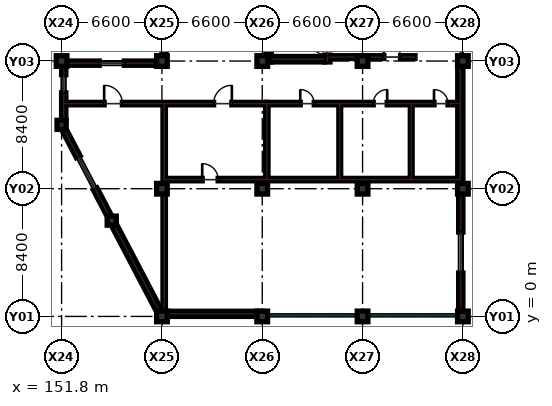
"""IFC4 building model, lengths in metres.
Left out: names, types, materials, properties, quantities, classifications, styles, units other than length and angle.
Written with IfcOpenShell. Run it as: python <this file> out.ifc"""

import sys

from ifc_helpers import new_model, si_unit, direction, frame, frame_2d, origin, origin_2d, place, context, subcontext, project, spatial, rectangle, extrude, element, fill, save


model = new_model("IFC4")
c1 = context("Model", 3, precision=1e-05, world=origin(), true_north=direction((0.0, 1.0)))
c2 = subcontext(c1, "Body", "Model", "MODEL_VIEW")
j1 = project(units=[si_unit("LENGTHUNIT", "METRE"), si_unit("PLANEANGLEUNIT", "RADIAN")], contexts=[c1])
p1 = place(None, origin())
s1 = spatial("IfcSite", under=j1, at=p1, CompositionType="ELEMENT")
p2 = place(p1, origin())
s2 = spatial("IfcBuilding", under=s1, at=p2, CompositionType="ELEMENT")
p3 = place(p2, frame((0.0, 0.0, 27.0)))
s3 = spatial("IfcBuildingStorey", under=s2, at=p3, CompositionType="ELEMENT", Elevation=27.0)
for number, where, z_axis, x_axis in (
    (1, (151.8, 16.8, 0.0), (0.0, 0.0, 1.0), (1.0, 0.0, 0.0)),
    (2, (158.4, 0.0, 0.0), (0.0, 0.0, 1.0), (1.0, 0.0, 0.0)),
    (3, (158.4, 8.4, 0.0), (0.0, 0.0, 1.0), (1.0, 0.0, 0.0)),
    (4, (158.4, 16.8, 0.0), (0.0, 0.0, 1.0), (1.0, 0.0, 0.0)),
    (5, (165.0, 0.0, 0.0), (0.0, 0.0, 1.0), (1.0, 0.0, 0.0)),
    (6, (165.0, 8.4, 0.0), (0.0, 0.0, 1.0), (1.0, 0.0, 0.0)),
    (7, (165.0, 16.8, 0.0), (0.0, 0.0, 1.0), (1.0, 0.0, 0.0)),
    (8, (171.6, 0.0, 0.0), (0.0, 0.0, 1.0), (1.0, 0.0, 0.0)),
    (9, (171.6, 8.4, 0.0), (0.0, 0.0, 1.0), (1.0, 0.0, 0.0)),
    (10, (171.6, 16.8, 0.0), (0.0, 0.0, 1.0), (1.0, 0.0, 0.0)),
    (11, (178.2, 0.0, 0.0), (0.0, 0.0, 1.0), (1.0, 0.0, 0.0)),
    (12, (178.2, 8.4, 0.0), (0.0, 0.0, 1.0), (1.0, 0.0, 0.0)),
    (13, (178.2, 16.8, 0.0), (0.0, 0.0, 1.0), (1.0, 0.0, 0.0)),
):
    element("IfcColumn", number, at=place(p3, frame(where, z_axis=z_axis, x_axis=x_axis)), inside=s3, PredefinedType="COLUMN", context=c2, shape_type="SweptSolid", body=[
        extrude(rectangle(XDim=0.7, YDim=0.7, at=origin_2d()), origin(), (0.0, 0.0, 1.0), 4.2),
    ])
for number, where, z_axis, x_axis in (
    (14, (151.8, 12.6, 0.0), (0.0, 0.0, 1.0), (1.0, 0.0, 0.0)),
    (15, (155.1, 6.3, 0.0), (0.0, 0.0, 1.0), (1.0, 0.0, 0.0)),
):
    element("IfcColumn", number, at=place(p3, frame(where, z_axis=z_axis, x_axis=x_axis)), inside=s3, PredefinedType="COLUMN", context=c2, shape_type="SweptSolid", body=[
        extrude(rectangle(XDim=0.6, YDim=0.6, at=origin_2d()), origin(), (0.0, 0.0, 1.0), 4.2),
    ])
p4 = place(p3, frame((165.3, 14.0, 0.0), z_axis=(0.0, 0.0, 1.0), x_axis=(1.0, 0.0, 0.0)))
e16 = element("IfcWall", 16, at=p4, inside=s3, PredefinedType="PARTITIONING", context=c2, shape_type="SweptSolid", body=[
    extrude(rectangle(XDim=12.7, YDim=0.16, at=frame_2d((6.35, 0.0))), origin(), (0.0, 0.0, 1.0), 3.23),
])
p5 = place(p4, frame((2.2, 0.0, 0.0)))
e17 = element("IfcOpeningElement", 17, at=p5, cuts=e16, PredefinedType="OPENING", context=c2, shape_type="SweptSolid", body=[
    extrude(rectangle(XDim=0.92, YDim=2.08, at=frame_2d((0.46, 1.04))), frame((0.0, 0.09, 0.0), z_axis=(0.0, -1.0, 0.0), x_axis=(1.0, 0.0, 0.0)), (0.0, 0.0, 1.0), 0.18),
])
p6 = place(p4, frame((7.0, 0.0, 0.0)))
e18 = element("IfcOpeningElement", 18, at=p6, cuts=e16, PredefinedType="OPENING", context=c2, shape_type="SweptSolid", body=[
    extrude(rectangle(XDim=0.92, YDim=2.08, at=frame_2d((0.46, 1.04))), frame((0.0, 0.09, 0.0), z_axis=(0.0, -1.0, 0.0), x_axis=(1.0, 0.0, 0.0)), (0.0, 0.0, 1.0), 0.18),
])
p7 = place(p4, frame((11.0, 0.0, 0.0)))
e19 = element("IfcOpeningElement", 19, at=p7, cuts=e16, PredefinedType="OPENING", context=c2, shape_type="SweptSolid", body=[
    extrude(rectangle(XDim=0.92, YDim=2.08, at=frame_2d((0.46, 1.04))), frame((0.0, 0.09, 0.0), z_axis=(0.0, -1.0, 0.0), x_axis=(1.0, 0.0, 0.0)), (0.0, 0.0, 1.0), 0.18),
])
p8 = place(p3, frame((165.3, 9.0, 0.0), z_axis=(0.0, 0.0, 1.0), x_axis=(1.0, 0.0, 0.0)))
e20 = element("IfcWall", 20, at=p8, inside=s3, PredefinedType="PARTITIONING", context=c2, shape_type="SweptSolid", body=[
    extrude(rectangle(XDim=12.7, YDim=0.16, at=frame_2d((6.35, 0.0))), origin(), (0.0, 0.0, 1.0), 3.23),
])
p9 = place(p3, frame((165.3, 9.0, 0.0), z_axis=(0.0, 0.0, 1.0), x_axis=(0.0, 1.0, 0.0)))
e21 = element("IfcWall", 21, at=p9, inside=s3, PredefinedType="PARTITIONING", context=c2, shape_type="SweptSolid", body=[
    extrude(rectangle(XDim=5.0, YDim=0.16, at=frame_2d((2.5, 0.0))), origin(), (0.0, 0.0, 1.0), 3.23),
])
for number, where, z_axis, x_axis in (
    (22, (170.1, 9.0, 0.0), (0.0, 0.0, 1.0), (0.0, 1.0, 0.0)),
    (23, (174.8, 9.0, 0.0), (0.0, 0.0, 1.0), (0.0, 1.0, 0.0)),
):
    element("IfcWall", number, at=place(p3, frame(where, z_axis=z_axis, x_axis=x_axis)), inside=s3, PredefinedType="PARTITIONING", context=c2, shape_type="SweptSolid", body=[
        extrude(rectangle(XDim=5.0, YDim=0.12, at=frame_2d((2.5, 0.0))), origin(), (0.0, 0.0, 1.0), 3.23),
    ])
p10 = place(p3, frame((158.55, 9.0, 0.0), z_axis=(0.0, 0.0, 1.0), x_axis=(1.0, 0.0, 0.0)))
e24 = element("IfcWall", 24, at=p10, inside=s3, PredefinedType="PARTITIONING", context=c2, shape_type="SweptSolid", body=[
    extrude(rectangle(XDim=6.75, YDim=0.16, at=frame_2d((3.375, 0.0))), origin(), (0.0, 0.0, 1.0), 3.23),
])
p11 = place(p10, frame((2.5, 0.0, 0.0)))
e25 = element("IfcOpeningElement", 25, at=p11, cuts=e24, PredefinedType="OPENING", context=c2, shape_type="SweptSolid", body=[
    extrude(rectangle(XDim=1.05, YDim=2.15, at=frame_2d((0.525, 1.075))), frame((0.0, 0.09, 0.0), z_axis=(0.0, -1.0, 0.0), x_axis=(1.0, 0.0, 0.0)), (0.0, 0.0, 1.0), 0.18),
])
p12 = place(p3, frame((158.55, 0.25, 0.0), z_axis=(0.0, 0.0, 1.0), x_axis=(0.0, 1.0, 0.0)))
e26 = element("IfcWall", 26, at=p12, inside=s3, PredefinedType="PARTITIONING", context=c2, shape_type="SweptSolid", body=[
    extrude(rectangle(XDim=7.7, YDim=0.16, at=frame_2d((3.85, 0.0))), origin(), (0.0, 0.0, 1.0), 3.23),
])
p13 = place(p3, frame((158.55, 8.85, 0.0), z_axis=(0.0, 0.0, 1.0), x_axis=(0.0, 1.0, 0.0)))
e27 = element("IfcWall", 27, at=p13, inside=s3, PredefinedType="PARTITIONING", context=c2, shape_type="SweptSolid", body=[
    extrude(rectangle(XDim=5.15, YDim=0.16, at=frame_2d((2.575, 0.0))), origin(), (0.0, 0.0, 1.0), 3.23),
])
p14 = place(p3, frame((152.0, 14.0, 0.0), z_axis=(0.0, 0.0, 1.0), x_axis=(1.0, 0.0, 0.0)))
e28 = element("IfcWall", 28, at=p14, inside=s3, PredefinedType="PARTITIONING", context=c2, shape_type="SweptSolid", body=[
    extrude(rectangle(XDim=13.3, YDim=0.16, at=frame_2d((6.65, 0.0))), origin(), (0.0, 0.0, 1.0), 3.23),
])
p15 = place(p14, frame((2.6, 0.0, 0.0)))
e29 = element("IfcOpeningElement", 29, at=p15, cuts=e28, PredefinedType="OPENING", context=c2, shape_type="SweptSolid", body=[
    extrude(rectangle(XDim=1.2, YDim=2.22, at=frame_2d((0.6, 1.11))), frame((0.0, 0.09, 0.0), z_axis=(0.0, -1.0, 0.0), x_axis=(1.0, 0.0, 0.0)), (0.0, 0.0, 1.0), 0.18),
])
p16 = place(p14, frame((9.8, 0.0, 0.0)))
e30 = element("IfcOpeningElement", 30, at=p16, cuts=e28, PredefinedType="OPENING", context=c2, shape_type="SweptSolid", body=[
    extrude(rectangle(XDim=1.2, YDim=2.22, at=frame_2d((0.6, 1.11))), frame((0.0, 0.09, 0.0), z_axis=(0.0, -1.0, 0.0), x_axis=(1.0, 0.0, 0.0)), (0.0, 0.0, 1.0), 0.18),
])
p17 = place(p3, frame((158.055, 16.66, 0.0), z_axis=(0.0, 0.0, 1.0), x_axis=(-1.0, 0.0, 0.0)))
e31 = element("IfcWall", 31, at=p17, inside=s3, PredefinedType="SOLIDWALL", context=c2, shape_type="SweptSolid", body=[
    extrude(rectangle(XDim=5.91, YDim=0.28, at=frame_2d((2.955, 0.0))), origin(), (0.0, 0.0, 1.0), 3.315),
])
p18 = place(p17, frame((2.13, 0.0, 0.95)))
e32 = element("IfcOpeningElement", 32, at=p18, cuts=e31, PredefinedType="OPENING", context=c2, shape_type="SweptSolid", body=[
    extrude(rectangle(XDim=1.65, YDim=1.55, at=frame_2d((0.825, 0.775))), frame((0.0, 0.15, 0.0), z_axis=(0.0, -1.0, 0.0), x_axis=(1.0, 0.0, 0.0)), (0.0, 0.0, 1.0), 0.3),
])
p19 = place(p3, frame((158.745, 0.17, 0.0), z_axis=(0.0, 0.0, 1.0), x_axis=(1.0, 0.0, 0.0)))
e33 = element("IfcWall", 33, at=p19, inside=s3, PredefinedType="SHEAR", context=c2, shape_type="SweptSolid", body=[
    extrude(rectangle(XDim=5.91, YDim=0.34, at=frame_2d((2.955, 0.0))), origin(), (0.0, 0.0, 1.0), 3.98),
])
p20 = place(p3, frame((158.54, 24.855, 0.0), z_axis=(0.0, 0.0, 1.0), x_axis=(0.0, -1.0, 0.0)))
e34 = element("IfcWall", 34, at=p20, inside=s3, PredefinedType="SOLIDWALL", context=c2, shape_type="SweptSolid", body=[
    extrude(rectangle(XDim=7.71, YDim=0.28, at=frame_2d((3.855, 0.0))), origin(), (0.0, 0.0, 1.0), 3.365),
])
p21 = place(p20, frame((3.28, 0.0, 0.95)))
e35 = element("IfcOpeningElement", 35, at=p21, cuts=e34, PredefinedType="OPENING", context=c2, shape_type="SweptSolid", body=[
    extrude(rectangle(XDim=1.15, YDim=1.6, at=frame_2d((0.575, 0.8))), frame((0.0, 0.15, 0.0), z_axis=(0.0, -1.0, 0.0), x_axis=(1.0, 0.0, 0.0)), (0.0, 0.0, 1.0), 0.3),
])
p22 = place(p3, frame((178.06, 0.345, 0.0), z_axis=(0.0, 0.0, 1.0), x_axis=(0.0, 1.0, 0.0)))
e36 = element("IfcWall", 36, at=p22, inside=s3, PredefinedType="SOLIDWALL", context=c2, shape_type="SweptSolid", body=[
    extrude(rectangle(XDim=7.71, YDim=0.28, at=frame_2d((3.855, 0.0))), origin(), (0.0, 0.0, 1.0), 3.365),
])
p23 = place(p22, frame((2.505, 0.0, 0.95)))
e37 = element("IfcOpeningElement", 37, at=p23, cuts=e36, PredefinedType="OPENING", context=c2, shape_type="SweptSolid", body=[
    extrude(rectangle(XDim=2.7, YDim=2.05, at=frame_2d((1.35, 1.025))), frame((0.0, 0.15, 0.0), z_axis=(0.0, -1.0, 0.0), x_axis=(1.0, 0.0, 0.0)), (0.0, 0.0, 1.0), 0.3),
])
p24 = place(p3, frame((178.03, 8.745, 0.0), z_axis=(0.0, 0.0, 1.0), x_axis=(0.0, 1.0, 0.0)))
e38 = element("IfcWall", 38, at=p24, inside=s3, PredefinedType="SHEAR", context=c2, shape_type="SweptSolid", body=[
    extrude(rectangle(XDim=7.71, YDim=0.34, at=frame_2d((3.855, 0.0))), origin(), (0.0, 0.0, 1.0), 3.98),
])
p25 = place(p3, frame((151.94, 16.455, 0.0), z_axis=(0.0, 0.0, 1.0), x_axis=(0.0, -1.0, 0.0)))
e39 = element("IfcWall", 39, at=p25, inside=s3, PredefinedType="SOLIDWALL", context=c2, shape_type="SweptSolid", body=[
    extrude(rectangle(XDim=3.56, YDim=0.28, at=frame_2d((1.78, 0.0))), origin(), (0.0, 0.0, 1.0), 3.365),
])
p26 = place(p25, frame((0.55, 0.0, 0.95)))
e40 = element("IfcOpeningElement", 40, at=p26, cuts=e39, PredefinedType="OPENING", context=c2, shape_type="SweptSolid", body=[
    extrude(rectangle(XDim=1.2, YDim=1.5, at=frame_2d((0.6, 0.75))), frame((0.0, 0.15, 0.0), z_axis=(0.0, -1.0, 0.0), x_axis=(1.0, 0.0, 0.0)), (0.0, 0.0, 1.0), 0.3),
])
p27 = place(p3, frame((151.95, 12.31, 0.0), z_axis=(0.0, 0.0, 1.0), x_axis=(0.464471613901, -0.885588007981, 0.0)))
e41 = element("IfcWall", 41, at=p27, inside=s3, PredefinedType="SOLIDWALL", context=c2, shape_type="SweptSolid", body=[
    extrude(rectangle(XDim=6.459, YDim=0.28, at=frame_2d((3.229, 0.0))), origin(), (0.0, 0.0, 1.0), 3.365),
])
p28 = place(p27, frame((2.03, 0.0, 0.95)))
e42 = element("IfcOpeningElement", 42, at=p28, cuts=e41, PredefinedType="OPENING", context=c2, shape_type="SweptSolid", body=[
    extrude(rectangle(XDim=2.4, YDim=1.6, at=frame_2d((1.2, 0.8))), frame((0.0, 0.15, 0.0), z_axis=(0.0, -1.0, 0.0), x_axis=(1.0, 0.0, 0.0)), (0.0, 0.0, 1.0), 0.3),
])
p29 = place(p3, frame((155.25, 6.01, 0.0), z_axis=(0.0, 0.0, 1.0), x_axis=(0.464471613901, -0.885588007981, 0.0)))
e43 = element("IfcWall", 43, at=p29, inside=s3, PredefinedType="SHEAR", context=c2, shape_type="SweptSolid", body=[
    extrude(rectangle(XDim=6.459, YDim=0.34, at=frame_2d((3.229, 0.0))), origin(), (0.0, 0.0, 1.0), 3.98),
])
p30 = place(p3, frame((165.42, 16.74, 0.0), z_axis=(0.0, 0.0, 1.0), x_axis=(0.0, 1.0, 0.0)))
e44 = element("IfcWall", 44, at=p30, inside=s3, PredefinedType="SHEAR", context=c2, shape_type="SweptSolid", body=[
    extrude(rectangle(XDim=8.37, YDim=0.36, at=frame_2d((4.185, 0.0))), origin(), (0.0, 0.0, 1.0), 3.98),
])
p31 = place(p3, frame((169.28, 16.74, 0.0), z_axis=(0.0, 0.0, 1.0), x_axis=(0.0, 1.0, 0.0)))
e45 = element("IfcWall", 45, at=p31, inside=s3, PredefinedType="SHEAR", context=c2, shape_type="SweptSolid", body=[
    extrude(rectangle(XDim=8.37, YDim=0.36, at=frame_2d((4.185, 0.0))), origin(), (0.0, 0.0, 1.0), 3.98),
])
p32 = place(p31, frame((0.45, 0.0, 0.0)))
e46 = element("IfcOpeningElement", 46, at=p32, cuts=e45, PredefinedType="OPENING", context=c2, shape_type="SweptSolid", body=[
    extrude(rectangle(XDim=1.25, YDim=2.15, at=frame_2d((0.625, 1.075))), frame((0.0, 0.19, 0.0), z_axis=(0.0, -1.0, 0.0), x_axis=(1.0, 0.0, 0.0)), (0.0, 0.0, 1.0), 0.38),
])
p33 = place(p3, frame((165.6, 16.92, 0.0), z_axis=(0.0, 0.0, 1.0), x_axis=(1.0, 0.0, 0.0)))
e47 = element("IfcWall", 47, at=p33, inside=s3, PredefinedType="SHEAR", context=c2, shape_type="SweptSolid", body=[
    extrude(rectangle(XDim=3.5, YDim=0.36, at=frame_2d((1.75, 0.0))), origin(), (0.0, 0.0, 1.0), 3.98),
])
p34 = place(p3, frame((169.35, 17.06, 0.0), z_axis=(0.0, 0.0, 1.0), x_axis=(1.0, 0.0, 0.0)))
e48 = element("IfcWall", 48, at=p34, inside=s3, PredefinedType="SOLIDWALL", context=c2, shape_type="SweptSolid", body=[
    extrude(rectangle(XDim=5.7, YDim=0.18, at=frame_2d((2.85, 0.0))), origin(), (0.0, 0.0, 1.0), 3.315),
])
p35 = place(p34, frame((3.65, 0.0, 0.0)))
e49 = element("IfcOpeningElement", 49, at=p35, cuts=e48, PredefinedType="OPENING", context=c2, shape_type="SweptSolid", body=[
    extrude(rectangle(XDim=1.1, YDim=2.15, at=frame_2d((0.55, 1.075))), frame((0.0, 0.1, 0.0), z_axis=(0.0, -1.0, 0.0), x_axis=(1.0, 0.0, 0.0)), (0.0, 0.0, 1.0), 0.2),
])
p36 = place(p5, origin())
e50 = element("IfcDoor", 50, at=p36, inside=s3, OperationType="SINGLE_SWING_LEFT", PredefinedType="DOOR", context=c2, shape_type="SweptSolid", body=[
    extrude(rectangle(XDim=0.92, YDim=2.08, at=frame_2d((0.46, 1.04))), frame((0.0, 0.025, 0.0), z_axis=(0.0, -1.0, 0.0), x_axis=(1.0, 0.0, 0.0)), (0.0, 0.0, 1.0), 0.05),
])
fill(e17, e50)
p37 = place(p6, origin())
e51 = element("IfcDoor", 51, at=p37, inside=s3, OperationType="SINGLE_SWING_RIGHT", PredefinedType="DOOR", context=c2, shape_type="SweptSolid", body=[
    extrude(rectangle(XDim=0.92, YDim=2.08, at=frame_2d((0.46, 1.04))), frame((0.0, 0.025, 0.0), z_axis=(0.0, -1.0, 0.0), x_axis=(1.0, 0.0, 0.0)), (0.0, 0.0, 1.0), 0.05),
])
fill(e18, e51)
p38 = place(p7, origin())
e52 = element("IfcDoor", 52, at=p38, inside=s3, OperationType="SINGLE_SWING_LEFT", PredefinedType="DOOR", context=c2, shape_type="SweptSolid", body=[
    extrude(rectangle(XDim=0.92, YDim=2.08, at=frame_2d((0.46, 1.04))), frame((0.0, 0.025, 0.0), z_axis=(0.0, -1.0, 0.0), x_axis=(1.0, 0.0, 0.0)), (0.0, 0.0, 1.0), 0.05),
])
fill(e19, e52)
p39 = place(p11, origin())
e53 = element("IfcDoor", 53, at=p39, inside=s3, OperationType="SINGLE_SWING_LEFT", PredefinedType="DOOR", context=c2, shape_type="SweptSolid", body=[
    extrude(rectangle(XDim=1.05, YDim=2.15, at=frame_2d((0.525, 1.075))), frame((0.0, 0.025, 0.0), z_axis=(0.0, -1.0, 0.0), x_axis=(1.0, 0.0, 0.0)), (0.0, 0.0, 1.0), 0.05),
])
fill(e25, e53)
p40 = place(p15, origin())
e54 = element("IfcDoor", 54, at=p40, inside=s3, OperationType="SINGLE_SWING_LEFT", PredefinedType="DOOR", context=c2, shape_type="SweptSolid", body=[
    extrude(rectangle(XDim=1.2, YDim=2.22, at=frame_2d((0.6, 1.11))), frame((0.0, 0.025, 0.0), z_axis=(0.0, -1.0, 0.0), x_axis=(1.0, 0.0, 0.0)), (0.0, 0.0, 1.0), 0.05),
])
fill(e29, e54)
p41 = place(p16, origin())
e55 = element("IfcDoor", 55, at=p41, inside=s3, OperationType="SINGLE_SWING_RIGHT", PredefinedType="DOOR", context=c2, shape_type="SweptSolid", body=[
    extrude(rectangle(XDim=1.2, YDim=2.22, at=frame_2d((0.6, 1.11))), frame((0.0, 0.025, 0.0), z_axis=(0.0, -1.0, 0.0), x_axis=(1.0, 0.0, 0.0)), (0.0, 0.0, 1.0), 0.05),
])
fill(e30, e55)
p42 = place(p18, origin())
e56 = element("IfcWindow", 56, at=p42, inside=s3, PartitioningType="SINGLE_PANEL", PredefinedType="WINDOW", context=c2, shape_type="SweptSolid", body=[
    extrude(rectangle(XDim=1.65, YDim=1.55, at=frame_2d((0.825, 0.775))), frame((0.0, 0.03, 0.0), z_axis=(0.0, -1.0, 0.0), x_axis=(1.0, 0.0, 0.0)), (0.0, 0.0, 1.0), 0.06),
])
fill(e32, e56)
p43 = place(p23, origin())
e57 = element("IfcWindow", 57, at=p43, inside=s3, PartitioningType="SINGLE_PANEL", PredefinedType="WINDOW", context=c2, shape_type="SweptSolid", body=[
    extrude(rectangle(XDim=2.7, YDim=2.05, at=frame_2d((1.35, 1.025))), frame((0.0, 0.03, 0.0), z_axis=(0.0, -1.0, 0.0), x_axis=(1.0, 0.0, 0.0)), (0.0, 0.0, 1.0), 0.06),
])
fill(e37, e57)
p44 = place(p26, origin())
e58 = element("IfcWindow", 58, at=p44, inside=s3, PartitioningType="SINGLE_PANEL", PredefinedType="WINDOW", context=c2, shape_type="SweptSolid", body=[
    extrude(rectangle(XDim=1.2, YDim=1.5, at=frame_2d((0.6, 0.75))), frame((0.0, 0.03, 0.0), z_axis=(0.0, -1.0, 0.0), x_axis=(1.0, 0.0, 0.0)), (0.0, 0.0, 1.0), 0.06),
])
fill(e40, e58)
p45 = place(p28, origin())
e59 = element("IfcWindow", 59, at=p45, inside=s3, PartitioningType="SINGLE_PANEL", PredefinedType="WINDOW", context=c2, shape_type="SweptSolid", body=[
    extrude(rectangle(XDim=2.4, YDim=1.6, at=frame_2d((1.2, 0.8))), frame((0.0, 0.03, 0.0), z_axis=(0.0, -1.0, 0.0), x_axis=(1.0, 0.0, 0.0)), (0.0, 0.0, 1.0), 0.06),
])
fill(e42, e59)
p46 = place(p32, origin())
e60 = element("IfcDoor", 60, at=p46, inside=s3, OperationType="SINGLE_SWING_RIGHT", PredefinedType="DOOR", context=c2, shape_type="SweptSolid", body=[
    extrude(rectangle(XDim=1.25, YDim=2.15, at=frame_2d((0.625, 1.075))), frame((0.0, 0.025, 0.0), z_axis=(0.0, -1.0, 0.0), x_axis=(1.0, 0.0, 0.0)), (0.0, 0.0, 1.0), 0.05),
])
fill(e46, e60)
p47 = place(p35, origin())
e61 = element("IfcDoor", 61, at=p47, inside=s3, OperationType="SINGLE_SWING_LEFT", PredefinedType="DOOR", context=c2, shape_type="SweptSolid", body=[
    extrude(rectangle(XDim=1.1, YDim=2.15, at=frame_2d((0.55, 1.075))), frame((0.0, 0.025, 0.0), z_axis=(0.0, -1.0, 0.0), x_axis=(1.0, 0.0, 0.0)), (0.0, 0.0, 1.0), 0.05),
])
fill(e49, e61)
save(model, sys.argv[1])
